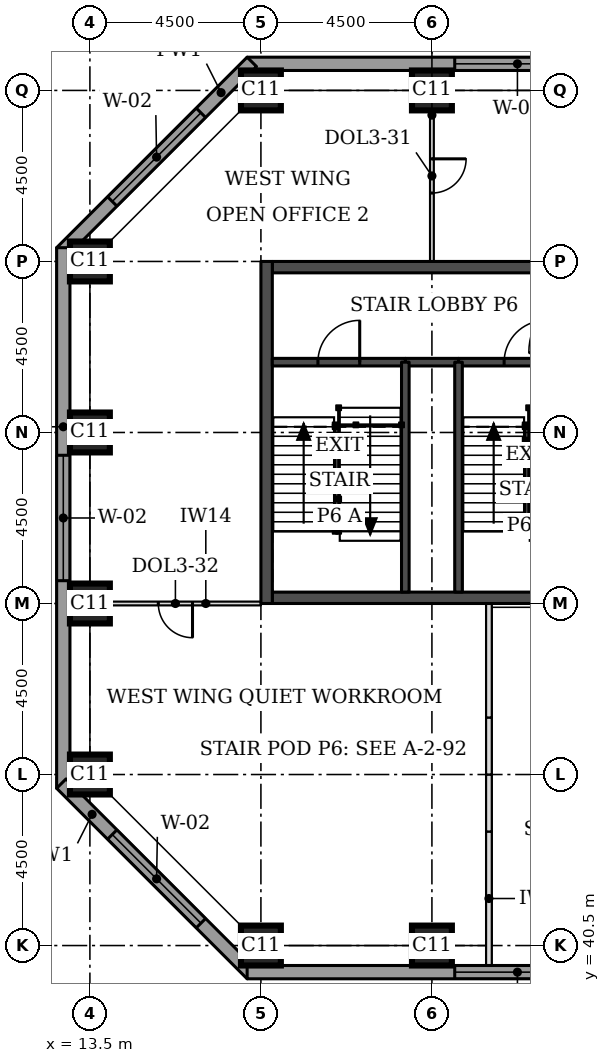
"""IFC4 building model, lengths in metres.
Left out: names, types, materials, properties, quantities, classifications, styles, units other than length and angle.
Written with IfcOpenShell. Run it as: python <this file> out.ifc"""

import sys

from ifc_helpers import new_model, si_unit, direction, frame, frame_2d, origin, origin_2d, place, context, subcontext, project, spatial, rectangle, extrude, element, fill, save


model = new_model("IFC4")
c1 = context("Model", 3, precision=1e-05, world=origin(), true_north=direction((0.0, 1.0)))
c2 = subcontext(c1, "Body", "Model", "MODEL_VIEW")
j1 = project(units=[si_unit("LENGTHUNIT", "METRE"), si_unit("PLANEANGLEUNIT", "RADIAN")], contexts=[c1])
p1 = place(None, origin())
s1 = spatial("IfcSite", under=j1, at=p1, CompositionType="ELEMENT")
p2 = place(p1, origin())
s2 = spatial("IfcBuilding", under=s1, at=p2, CompositionType="ELEMENT")
p3 = place(p2, frame((0.0, 0.0, 97.4)))
s3 = spatial("IfcBuildingStorey", under=s2, at=p3, CompositionType="ELEMENT", Elevation=97.4)
for number, where, z_axis, x_axis in (
    (1, (18.0, 40.5, 0.0), (0.0, 0.0, 1.0), (1.0, 0.0, 0.0)),
    (2, (22.5, 40.5, 0.0), (0.0, 0.0, 1.0), (1.0, 0.0, 0.0)),
    (3, (13.5, 45.0, 0.0), (0.0, 0.0, 1.0), (1.0, 0.0, 0.0)),
    (4, (13.5, 49.5, 0.0), (0.0, 0.0, 1.0), (1.0, 0.0, 0.0)),
    (5, (13.5, 54.0, 0.0), (0.0, 0.0, 1.0), (1.0, 0.0, 0.0)),
    (6, (13.5, 58.5, 0.0), (0.0, 0.0, 1.0), (1.0, 0.0, 0.0)),
    (7, (18.0, 63.0, 0.0), (0.0, 0.0, 1.0), (1.0, 0.0, 0.0)),
    (8, (22.5, 63.0, 0.0), (0.0, 0.0, 1.0), (1.0, 0.0, 0.0)),
):
    element("IfcColumn", number, at=place(p3, frame(where, z_axis=z_axis, x_axis=x_axis)), inside=s3, PredefinedType="COLUMN", context=c2, shape_type="SweptSolid", body=[
        extrude(rectangle(XDim=1.05, YDim=1.05, at=origin_2d()), origin(), (0.0, 0.0, 1.0), 3.7),
    ])
for number, where, z_axis, x_axis in (
    (9, (18.3, 49.65, 0.0), (0.0, 0.0, 1.0), (1.0, 0.0, 0.0)),
    (10, (18.3, 58.35, 0.0), (0.0, 0.0, 1.0), (1.0, 0.0, 0.0)),
):
    element("IfcWall", number, at=place(p3, frame(where, z_axis=z_axis, x_axis=x_axis)), inside=s3, PredefinedType="SHEAR", context=c2, shape_type="SweptSolid", body=[
        extrude(rectangle(XDim=8.4, YDim=0.3, at=frame_2d((4.2, 0.0))), origin(), (0.0, 0.0, 1.0), 3.7),
    ])
p4 = place(p3, frame((18.15, 49.5, 0.0), z_axis=(0.0, 0.0, 1.0), x_axis=(0.0, 1.0, 0.0)))
e11 = element("IfcWall", 11, at=p4, inside=s3, PredefinedType="SHEAR", context=c2, shape_type="SweptSolid", body=[
    extrude(rectangle(XDim=9.0, YDim=0.3, at=frame_2d((4.5, 0.0))), origin(), (0.0, 0.0, 1.0), 3.7),
])
p5 = place(p3, frame((35.475, 63.7, 0.0), z_axis=(0.0, 0.0, 1.0), x_axis=(-1.0, 0.0, 0.0)))
e12 = element("IfcWall", 12, at=p5, inside=s3, PredefinedType="STANDARD", context=c2, shape_type="SweptSolid", body=[
    extrude(rectangle(XDim=17.837, YDim=0.35, at=frame_2d((8.919, 0.0))), origin(), (0.0, 0.0, 1.0), 3.525),
])
p6 = place(p5, frame((0.5, 0.0, 0.9)))
e13 = element("IfcOpeningElement", 13, at=p6, cuts=e12, PredefinedType="OPENING", context=c2, shape_type="SweptSolid", body=[
    extrude(rectangle(XDim=3.3, YDim=1.9, at=frame_2d((1.65, 0.95))), frame((0.0, 0.185, 0.0), z_axis=(0.0, -1.0, 0.0), x_axis=(1.0, 0.0, 0.0)), (0.0, 0.0, 1.0), 0.37),
])
p7 = place(p5, frame((9.075, 0.0, 0.9)))
e14 = element("IfcOpeningElement", 14, at=p7, cuts=e12, PredefinedType="OPENING", context=c2, shape_type="SweptSolid", body=[
    extrude(rectangle(XDim=3.3, YDim=1.9, at=frame_2d((1.65, 0.95))), frame((0.0, 0.185, 0.0), z_axis=(0.0, -1.0, 0.0), x_axis=(1.0, 0.0, 0.0)), (0.0, 0.0, 1.0), 0.37),
])
p8 = place(p3, frame((17.761, 63.751, 0.0), z_axis=(0.0, 0.0, 1.0), x_axis=(-0.707106781187, -0.707106781187, 0.0)))
e15 = element("IfcWall", 15, at=p8, inside=s3, PredefinedType="STANDARD", context=c2, shape_type="SweptSolid", body=[
    extrude(rectangle(XDim=7.089, YDim=0.35, at=frame_2d((3.544, 0.0))), origin(), (0.0, 0.0, 1.0), 3.525),
])
p9 = place(p8, frame((1.894, 0.0, 0.9)))
e16 = element("IfcOpeningElement", 16, at=p9, cuts=e15, PredefinedType="OPENING", context=c2, shape_type="SweptSolid", body=[
    extrude(rectangle(XDim=3.3, YDim=1.9, at=frame_2d((1.65, 0.95))), frame((0.0, 0.185, 0.0), z_axis=(0.0, -1.0, 0.0), x_axis=(1.0, 0.0, 0.0)), (0.0, 0.0, 1.0), 0.37),
])
p10 = place(p3, frame((12.8, 58.862, 0.0), z_axis=(0.0, 0.0, 1.0), x_axis=(0.0, -1.0, 0.0)))
e17 = element("IfcWall", 17, at=p10, inside=s3, PredefinedType="STANDARD", context=c2, shape_type="SweptSolid", body=[
    extrude(rectangle(XDim=14.225, YDim=0.35, at=frame_2d((7.112, 0.0))), origin(), (0.0, 0.0, 1.0), 3.525),
])
p11 = place(p10, frame((5.462, 0.0, 0.9)))
e18 = element("IfcOpeningElement", 18, at=p11, cuts=e17, PredefinedType="OPENING", context=c2, shape_type="SweptSolid", body=[
    extrude(rectangle(XDim=3.3, YDim=1.9, at=frame_2d((1.65, 0.95))), frame((0.0, 0.185, 0.0), z_axis=(0.0, -1.0, 0.0), x_axis=(1.0, 0.0, 0.0)), (0.0, 0.0, 1.0), 0.37),
])
p12 = place(p3, frame((12.749, 44.761, 0.0), z_axis=(0.0, 0.0, 1.0), x_axis=(0.707106781187, -0.707106781187, 0.0)))
e19 = element("IfcWall", 19, at=p12, inside=s3, PredefinedType="STANDARD", context=c2, shape_type="SweptSolid", body=[
    extrude(rectangle(XDim=7.089, YDim=0.35, at=frame_2d((3.544, 0.0))), origin(), (0.0, 0.0, 1.0), 3.525),
])
p13 = place(p12, frame((1.894, 0.0, 0.9)))
e20 = element("IfcOpeningElement", 20, at=p13, cuts=e19, PredefinedType="OPENING", context=c2, shape_type="SweptSolid", body=[
    extrude(rectangle(XDim=3.3, YDim=1.9, at=frame_2d((1.65, 0.95))), frame((0.0, 0.185, 0.0), z_axis=(0.0, -1.0, 0.0), x_axis=(1.0, 0.0, 0.0)), (0.0, 0.0, 1.0), 0.37),
])
p14 = place(p3, frame((17.638, 39.8, 0.0), z_axis=(0.0, 0.0, 1.0), x_axis=(1.0, 0.0, 0.0)))
e21 = element("IfcWall", 21, at=p14, inside=s3, PredefinedType="STANDARD", context=c2, shape_type="SweptSolid", body=[
    extrude(rectangle(XDim=17.837, YDim=0.35, at=frame_2d((8.919, 0.0))), origin(), (0.0, 0.0, 1.0), 3.525),
])
p15 = place(p14, frame((5.462, 0.0, 0.9)))
e22 = element("IfcOpeningElement", 22, at=p15, cuts=e21, PredefinedType="OPENING", context=c2, shape_type="SweptSolid", body=[
    extrude(rectangle(XDim=3.3, YDim=1.9, at=frame_2d((1.65, 0.95))), frame((0.0, 0.185, 0.0), z_axis=(0.0, -1.0, 0.0), x_axis=(1.0, 0.0, 0.0)), (0.0, 0.0, 1.0), 0.37),
])
p16 = place(p14, frame((14.037, 0.0, 0.9)))
e23 = element("IfcOpeningElement", 23, at=p16, cuts=e21, PredefinedType="OPENING", context=c2, shape_type="SweptSolid", body=[
    extrude(rectangle(XDim=3.3, YDim=1.9, at=frame_2d((1.65, 0.95))), frame((0.0, 0.185, 0.0), z_axis=(0.0, -1.0, 0.0), x_axis=(1.0, 0.0, 0.0)), (0.0, 0.0, 1.0), 0.37),
])
p17 = place(p3, frame((24.0, 39.975, 0.0), z_axis=(0.0, 0.0, 1.0), x_axis=(0.0, 1.0, 0.0)))
e24 = element("IfcWall", 24, at=p17, inside=s3, PredefinedType="PARTITIONING", context=c2, shape_type="SweptSolid", body=[
    extrude(rectangle(XDim=3.525, YDim=0.15, at=frame_2d((1.762, 0.0))), origin(), (0.0, 0.0, 1.0), 3.55),
])
for number, where, z_axis, x_axis in (
    (25, (24.0, 43.5, 0.0), (0.0, 0.0, 1.0), (0.0, 1.0, 0.0)),
    (26, (24.0, 45.0, 0.0), (0.0, 0.0, 1.0), (0.0, 1.0, 0.0)),
):
    element("IfcWall", number, at=place(p3, frame(where, z_axis=z_axis, x_axis=x_axis)), inside=s3, PredefinedType="PARTITIONING", context=c2, shape_type="SweptSolid", body=[
        extrude(rectangle(XDim=1.5, YDim=0.15, at=frame_2d((0.75, 0.0))), origin(), (0.0, 0.0, 1.0), 3.55),
    ])
p18 = place(p3, frame((24.0, 46.5, 0.0), z_axis=(0.0, 0.0, 1.0), x_axis=(0.0, 1.0, 0.0)))
e27 = element("IfcWall", 27, at=p18, inside=s3, PredefinedType="PARTITIONING", context=c2, shape_type="SweptSolid", body=[
    extrude(rectangle(XDim=3.0, YDim=0.15, at=frame_2d((1.5, 0.0))), origin(), (0.0, 0.0, 1.0), 3.55),
])
p19 = place(p3, frame((22.5, 63.0, 0.0), z_axis=(0.0, 0.0, 1.0), x_axis=(0.0, -1.0, 0.0)))
e28 = element("IfcWall", 28, at=p19, inside=s3, PredefinedType="PARTITIONING", context=c2, shape_type="SweptSolid", body=[
    extrude(rectangle(XDim=4.5, YDim=0.1, at=frame_2d((2.25, 0.0))), origin(), (0.0, 0.0, 1.0), 3.55),
])
p20 = place(p19, frame((1.8, 0.0, 0.0)))
e29 = element("IfcOpeningElement", 29, at=p20, cuts=e28, PredefinedType="OPENING", context=c2, shape_type="SweptSolid", body=[
    extrude(rectangle(XDim=0.9, YDim=2.1, at=frame_2d((0.45, 1.05))), frame((0.0, 0.06, 0.0), z_axis=(0.0, -1.0, 0.0), x_axis=(1.0, 0.0, 0.0)), (0.0, 0.0, 1.0), 0.12),
])
p21 = place(p3, frame((13.5, 49.5, 0.0), z_axis=(0.0, 0.0, 1.0), x_axis=(1.0, 0.0, 0.0)))
e30 = element("IfcWall", 30, at=p21, inside=s3, PredefinedType="PARTITIONING", context=c2, shape_type="SweptSolid", body=[
    extrude(rectangle(XDim=4.5, YDim=0.1, at=frame_2d((2.25, 0.0))), origin(), (0.0, 0.0, 1.0), 3.55),
])
p22 = place(p21, frame((1.8, 0.0, 0.0)))
e31 = element("IfcOpeningElement", 31, at=p22, cuts=e30, PredefinedType="OPENING", context=c2, shape_type="SweptSolid", body=[
    extrude(rectangle(XDim=0.9, YDim=2.1, at=frame_2d((0.45, 1.05))), frame((0.0, 0.06, 0.0), z_axis=(0.0, -1.0, 0.0), x_axis=(1.0, 0.0, 0.0)), (0.0, 0.0, 1.0), 0.12),
])
p23 = place(p3, frame((21.8, 55.85, 0.0), z_axis=(0.0, 0.0, 1.0), x_axis=(1.0, 0.0, 0.0)))
e32 = element("IfcWall", 32, at=p23, inside=s3, PredefinedType="SOLIDWALL", context=c2, shape_type="SweptSolid", body=[
    extrude(rectangle(XDim=1.4, YDim=0.2, at=frame_2d((0.7, 0.0))), origin(), (0.0, 0.0, 1.0), 3.55),
])
p24 = place(p3, frame((18.3, 55.85, 0.0), z_axis=(0.0, 0.0, 1.0), x_axis=(1.0, 0.0, 0.0)))
e33 = element("IfcWall", 33, at=p24, inside=s3, PredefinedType="SOLIDWALL", context=c2, shape_type="SweptSolid", body=[
    extrude(rectangle(XDim=3.5, YDim=0.2, at=frame_2d((1.75, 0.0))), origin(), (0.0, 0.0, 1.0), 3.55),
])
p25 = place(p24, frame((1.2, 0.0, 0.0)))
e34 = element("IfcOpeningElement", 34, at=p25, cuts=e33, PredefinedType="OPENING", context=c2, shape_type="SweptSolid", body=[
    extrude(rectangle(XDim=1.1, YDim=2.1, at=frame_2d((0.55, 1.05))), frame((0.0, 0.11, 0.0), z_axis=(0.0, -1.0, 0.0), x_axis=(1.0, 0.0, 0.0)), (0.0, 0.0, 1.0), 0.22),
])
p26 = place(p3, frame((23.2, 55.85, 0.0), z_axis=(0.0, 0.0, 1.0), x_axis=(1.0, 0.0, 0.0)))
e35 = element("IfcWall", 35, at=p26, inside=s3, PredefinedType="SOLIDWALL", context=c2, shape_type="SweptSolid", body=[
    extrude(rectangle(XDim=3.5, YDim=0.2, at=frame_2d((1.75, 0.0))), origin(), (0.0, 0.0, 1.0), 3.55),
])
p27 = place(p26, frame((1.2, 0.0, 0.0)))
e36 = element("IfcOpeningElement", 36, at=p27, cuts=e35, PredefinedType="OPENING", context=c2, shape_type="SweptSolid", body=[
    extrude(rectangle(XDim=1.1, YDim=2.1, at=frame_2d((0.55, 1.05))), frame((0.0, 0.11, 0.0), z_axis=(0.0, -1.0, 0.0), x_axis=(1.0, 0.0, 0.0)), (0.0, 0.0, 1.0), 0.22),
])
for number, where, z_axis, x_axis in (
    (37, (21.8, 49.8, 0.0), (0.0, 0.0, 1.0), (0.0, 1.0, 0.0)),
    (38, (23.2, 49.8, 0.0), (0.0, 0.0, 1.0), (0.0, 1.0, 0.0)),
):
    element("IfcWall", number, at=place(p3, frame(where, z_axis=z_axis, x_axis=x_axis)), inside=s3, PredefinedType="SOLIDWALL", context=c2, shape_type="SweptSolid", body=[
        extrude(rectangle(XDim=6.05, YDim=0.2, at=frame_2d((3.025, 0.0))), origin(), (0.0, 0.0, 1.0), 3.55),
    ])
p28 = place(p7, origin())
e39 = element("IfcWindow", 39, at=p28, inside=s3, PartitioningType="SINGLE_PANEL", PredefinedType="WINDOW", context=c2, shape_type="SweptSolid", body=[
    extrude(rectangle(XDim=3.3, YDim=1.9, at=frame_2d((1.65, 0.95))), frame((0.0, 0.085, 0.0), z_axis=(0.0, -1.0, 0.0), x_axis=(1.0, 0.0, 0.0)), (0.0, 0.0, 1.0), 0.06),
])
fill(e14, e39)
p29 = place(p9, origin())
e40 = element("IfcWindow", 40, at=p29, inside=s3, PartitioningType="SINGLE_PANEL", PredefinedType="WINDOW", context=c2, shape_type="SweptSolid", body=[
    extrude(rectangle(XDim=3.3, YDim=1.9, at=frame_2d((1.65, 0.95))), frame((0.0, 0.085, 0.0), z_axis=(0.0, -1.0, 0.0), x_axis=(1.0, 0.0, 0.0)), (0.0, 0.0, 1.0), 0.06),
])
fill(e16, e40)
p30 = place(p11, origin())
e41 = element("IfcWindow", 41, at=p30, inside=s3, PartitioningType="SINGLE_PANEL", PredefinedType="WINDOW", context=c2, shape_type="SweptSolid", body=[
    extrude(rectangle(XDim=3.3, YDim=1.9, at=frame_2d((1.65, 0.95))), frame((0.0, 0.085, 0.0), z_axis=(0.0, -1.0, 0.0), x_axis=(1.0, 0.0, 0.0)), (0.0, 0.0, 1.0), 0.06),
])
fill(e18, e41)
p31 = place(p13, origin())
e42 = element("IfcWindow", 42, at=p31, inside=s3, PartitioningType="SINGLE_PANEL", PredefinedType="WINDOW", context=c2, shape_type="SweptSolid", body=[
    extrude(rectangle(XDim=3.3, YDim=1.9, at=frame_2d((1.65, 0.95))), frame((0.0, 0.085, 0.0), z_axis=(0.0, -1.0, 0.0), x_axis=(1.0, 0.0, 0.0)), (0.0, 0.0, 1.0), 0.06),
])
fill(e20, e42)
p32 = place(p15, origin())
e43 = element("IfcWindow", 43, at=p32, inside=s3, PartitioningType="SINGLE_PANEL", PredefinedType="WINDOW", context=c2, shape_type="SweptSolid", body=[
    extrude(rectangle(XDim=3.3, YDim=1.9, at=frame_2d((1.65, 0.95))), frame((0.0, 0.085, 0.0), z_axis=(0.0, -1.0, 0.0), x_axis=(1.0, 0.0, 0.0)), (0.0, 0.0, 1.0), 0.06),
])
fill(e22, e43)
p33 = place(p20, origin())
e44 = element("IfcDoor", 44, at=p33, inside=s3, OperationType="SINGLE_SWING_LEFT", PredefinedType="DOOR", context=c2, shape_type="SweptSolid", body=[
    extrude(rectangle(XDim=0.9, YDim=2.1, at=frame_2d((0.45, 1.05))), frame((0.0, 0.025, 0.0), z_axis=(0.0, -1.0, 0.0), x_axis=(1.0, 0.0, 0.0)), (0.0, 0.0, 1.0), 0.05),
])
fill(e29, e44)
p34 = place(p22, frame((0.9, 0.0, 0.0), z_axis=(0.0, 0.0, 1.0), x_axis=(-1.0, 0.0, 0.0)))
e45 = element("IfcDoor", 45, at=p34, inside=s3, OperationType="SINGLE_SWING_LEFT", PredefinedType="DOOR", context=c2, shape_type="SweptSolid", body=[
    extrude(rectangle(XDim=0.9, YDim=2.1, at=frame_2d((0.45, 1.05))), frame((0.0, 0.025, 0.0), z_axis=(0.0, -1.0, 0.0), x_axis=(1.0, 0.0, 0.0)), (0.0, 0.0, 1.0), 0.05),
])
fill(e31, e45)
p35 = place(p25, origin())
e46 = element("IfcDoor", 46, at=p35, inside=s3, OperationType="SINGLE_SWING_RIGHT", PredefinedType="DOOR", context=c2, shape_type="SweptSolid", body=[
    extrude(rectangle(XDim=1.1, YDim=2.1, at=frame_2d((0.55, 1.05))), frame((0.0, 0.025, 0.0), z_axis=(0.0, -1.0, 0.0), x_axis=(1.0, 0.0, 0.0)), (0.0, 0.0, 1.0), 0.05),
])
fill(e34, e46)
p36 = place(p27, origin())
e47 = element("IfcDoor", 47, at=p36, inside=s3, OperationType="SINGLE_SWING_RIGHT", PredefinedType="DOOR", context=c2, shape_type="SweptSolid", body=[
    extrude(rectangle(XDim=1.1, YDim=2.1, at=frame_2d((0.55, 1.05))), frame((0.0, 0.025, 0.0), z_axis=(0.0, -1.0, 0.0), x_axis=(1.0, 0.0, 0.0)), (0.0, 0.0, 1.0), 0.05),
])
fill(e36, e47)
save(model, sys.argv[1])
